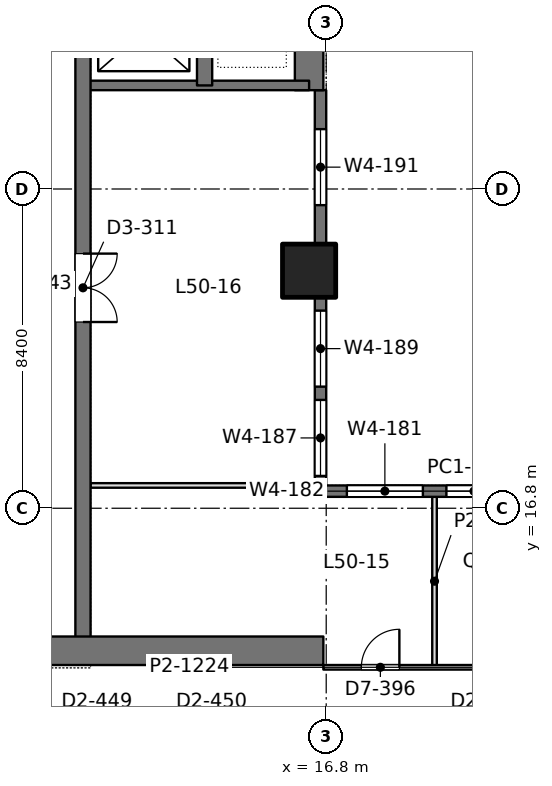
"""IFC4 building model, lengths in metres.
Left out: names, types, materials, properties, quantities, classifications, styles, units other than length and angle.
Written with IfcOpenShell. Run it as: python <this file> out.ifc"""

import sys

from ifc_helpers import new_model, si_unit, direction, frame, frame_2d, origin, origin_2d, place, context, subcontext, project, spatial, rectangle, extrude, element, fill, save


model = new_model("IFC4")
c1 = context("Model", 3, precision=1e-05, world=origin(), true_north=direction((0.0, 1.0)))
c2 = subcontext(c1, "Body", "Model", "MODEL_VIEW")
j1 = project(units=[si_unit("LENGTHUNIT", "METRE"), si_unit("PLANEANGLEUNIT", "RADIAN")], contexts=[c1])
p1 = place(None, origin())
s1 = spatial("IfcSite", under=j1, at=p1, CompositionType="ELEMENT")
p2 = place(p1, origin())
s2 = spatial("IfcBuilding", under=s1, at=p2, CompositionType="ELEMENT")
p3 = place(p2, frame((0.0, 0.0, 219.6)))
s3 = spatial("IfcBuildingStorey", under=s2, at=p3, CompositionType="ELEMENT", Elevation=219.6)
p4 = place(p3, frame((16.35, 23.05, 0.0), z_axis=(0.0, 0.0, 1.0), x_axis=(1.0, 0.0, 0.0)))
e1 = element("IfcColumn", 1, at=p4, inside=s3, PredefinedType="COLUMN", context=c2, shape_type="SweptSolid", body=[
    extrude(rectangle(XDim=1.4, YDim=1.4, at=origin_2d()), origin(), (0.0, 0.0, 1.0), 4.2),
])
p5 = place(p3, frame((-1.125, 13.05, 0.0), z_axis=(0.0, 0.0, 1.0), x_axis=(1.0, 0.0, 0.0)))
e2 = element("IfcWall", 2, at=p5, inside=s3, PredefinedType="SHEAR", context=c2, shape_type="SweptSolid", body=[
    extrude(rectangle(XDim=17.85, YDim=0.75, at=frame_2d((8.925, 0.0))), origin(), (0.0, 0.0, 1.0), 4.2),
])
p6 = place(p5, frame((8.875, 0.0, 0.0)))
e3 = element("IfcOpeningElement", 3, at=p6, cuts=e2, PredefinedType="OPENING", context=c2, shape_type="SweptSolid", body=[
    extrude(rectangle(XDim=1.8, YDim=2.4, at=frame_2d((0.9, 1.2))), frame((0.0, 0.385, 0.0), z_axis=(0.0, -1.0, 0.0), x_axis=(1.0, 0.0, 0.0)), (0.0, 0.0, 1.0), 0.77),
])
p7 = place(p3, frame((16.35, 27.8, 0.0), z_axis=(0.0, 0.0, 1.0), x_axis=(0.0, 1.0, 0.0)))
e4 = element("IfcWall", 4, at=p7, inside=s3, PredefinedType="SHEAR", context=c2, shape_type="SweptSolid", body=[
    extrude(rectangle(XDim=9.55, YDim=0.75, at=frame_2d((4.775, 0.0))), origin(), (0.0, 0.0, 1.0), 4.2),
])
p8 = place(p3, frame((10.4, 13.05, 0.0), z_axis=(0.0, 0.0, 1.0), x_axis=(0.0, 1.0, 0.0)))
e5 = element("IfcWall", 5, at=p8, inside=s3, PredefinedType="SHEAR", context=c2, shape_type="SweptSolid", body=[
    extrude(rectangle(XDim=24.3, YDim=0.4, at=frame_2d((12.15, 0.0))), origin(), (0.0, 0.0, 1.0), 4.2),
])
p9 = place(p8, frame((15.75, 0.0, 0.0)))
e6 = element("IfcOpeningElement", 6, at=p9, cuts=e5, PredefinedType="OPENING", context=c2, shape_type="SweptSolid", body=[
    extrude(rectangle(XDim=1.1, YDim=2.2, at=frame_2d((0.55, 1.1))), frame((0.0, 0.21, 0.0), z_axis=(0.0, -1.0, 0.0), x_axis=(1.0, 0.0, 0.0)), (0.0, 0.0, 1.0), 0.42),
])
p10 = place(p8, frame((18.6, 0.0, 0.0)))
e7 = element("IfcOpeningElement", 7, at=p10, cuts=e5, PredefinedType="OPENING", context=c2, shape_type="SweptSolid", body=[
    extrude(rectangle(XDim=1.1, YDim=2.2, at=frame_2d((0.55, 1.1))), frame((0.0, 0.21, 0.0), z_axis=(0.0, -1.0, 0.0), x_axis=(1.0, 0.0, 0.0)), (0.0, 0.0, 1.0), 0.42),
])
p11 = place(p8, frame((21.45, 0.0, 0.0)))
e8 = element("IfcOpeningElement", 8, at=p11, cuts=e5, PredefinedType="OPENING", context=c2, shape_type="SweptSolid", body=[
    extrude(rectangle(XDim=1.1, YDim=2.2, at=frame_2d((0.55, 1.1))), frame((0.0, 0.21, 0.0), z_axis=(0.0, -1.0, 0.0), x_axis=(1.0, 0.0, 0.0)), (0.0, 0.0, 1.0), 0.42),
])
p12 = place(p8, frame((8.65, 0.0, 0.0)))
e9 = element("IfcOpeningElement", 9, at=p12, cuts=e5, PredefinedType="OPENING", context=c2, shape_type="SweptSolid", body=[
    extrude(rectangle(XDim=1.8, YDim=2.4, at=frame_2d((0.9, 1.2))), frame((0.0, 0.21, 0.0), z_axis=(0.0, -1.0, 0.0), x_axis=(1.0, 0.0, 0.0)), (0.0, 0.0, 1.0), 0.42),
])
p13 = place(p3, frame((13.6, 27.925, 0.0), z_axis=(0.0, 0.0, 1.0), x_axis=(0.0, 1.0, 0.0)))
e10 = element("IfcWall", 10, at=p13, inside=s3, PredefinedType="SHEAR", context=c2, shape_type="SweptSolid", body=[
    extrude(rectangle(XDim=9.425, YDim=0.4, at=frame_2d((4.712, 0.0))), origin(), (0.0, 0.0, 1.0), 4.2),
])
p14 = place(p3, frame((10.4, 27.925, 0.0), z_axis=(0.0, 0.0, 1.0), x_axis=(1.0, 0.0, 0.0)))
e11 = element("IfcWall", 11, at=p14, inside=s3, PredefinedType="SHEAR", context=c2, shape_type="SweptSolid", body=[
    extrude(rectangle(XDim=5.95, YDim=0.25, at=frame_2d((2.975, 0.0))), origin(), (0.0, 0.0, 1.0), 4.2),
])
p15 = place(p3, frame((16.65, 17.1, 0.0), z_axis=(0.0, 0.0, 1.0), x_axis=(0.0, 1.0, 0.0)))
e12 = element("IfcWall", 12, at=p15, inside=s3, PredefinedType="SOLIDWALL", context=c2, shape_type="SweptSolid", body=[
    extrude(rectangle(XDim=10.7, YDim=0.3, at=frame_2d((5.35, 0.0))), origin(), (0.0, 0.0, 1.0), 4.05),
])
p16 = place(p15, frame((0.55, 0.0, 0.9)))
e13 = element("IfcOpeningElement", 13, at=p16, cuts=e12, PredefinedType="OPENING", context=c2, shape_type="SweptSolid", body=[
    extrude(rectangle(XDim=2.0, YDim=1.9, at=frame_2d((1.0, 0.95))), frame((0.0, 0.16, 0.0), z_axis=(0.0, -1.0, 0.0), x_axis=(1.0, 0.0, 0.0)), (0.0, 0.0, 1.0), 0.32),
])
p17 = place(p15, frame((2.9, 0.0, 0.9)))
e14 = element("IfcOpeningElement", 14, at=p17, cuts=e12, PredefinedType="OPENING", context=c2, shape_type="SweptSolid", body=[
    extrude(rectangle(XDim=2.0, YDim=1.9, at=frame_2d((1.0, 0.95))), frame((0.0, 0.16, 0.0), z_axis=(0.0, -1.0, 0.0), x_axis=(1.0, 0.0, 0.0)), (0.0, 0.0, 1.0), 0.32),
])
p18 = place(p15, frame((7.675, 0.0, 0.9)))
e15 = element("IfcOpeningElement", 15, at=p18, cuts=e12, PredefinedType="OPENING", context=c2, shape_type="SweptSolid", body=[
    extrude(rectangle(XDim=2.0, YDim=1.9, at=frame_2d((1.0, 0.95))), frame((0.0, 0.16, 0.0), z_axis=(0.0, -1.0, 0.0), x_axis=(1.0, 0.0, 0.0)), (0.0, 0.0, 1.0), 0.32),
])
p19 = place(p3, frame((16.725, 17.25, 0.0), z_axis=(0.0, 0.0, 1.0), x_axis=(1.0, 0.0, 0.0)))
e16 = element("IfcWall", 16, at=p19, inside=s3, PredefinedType="SOLIDWALL", context=c2, shape_type="SweptSolid", body=[
    extrude(rectangle(XDim=7.925, YDim=0.3, at=frame_2d((3.962, 0.0))), origin(), (0.0, 0.0, 1.0), 4.05),
])
p20 = place(p19, frame((0.619, 0.0, 0.9)))
e17 = element("IfcOpeningElement", 17, at=p20, cuts=e16, PredefinedType="OPENING", context=c2, shape_type="SweptSolid", body=[
    extrude(rectangle(XDim=2.0, YDim=1.9, at=frame_2d((1.0, 0.95))), frame((0.0, 0.16, 0.0), z_axis=(0.0, -1.0, 0.0), x_axis=(1.0, 0.0, 0.0)), (0.0, 0.0, 1.0), 0.32),
])
p21 = place(p19, frame((3.238, 0.0, 0.9)))
e18 = element("IfcOpeningElement", 18, at=p21, cuts=e16, PredefinedType="OPENING", context=c2, shape_type="SweptSolid", body=[
    extrude(rectangle(XDim=2.0, YDim=1.9, at=frame_2d((1.0, 0.95))), frame((0.0, 0.16, 0.0), z_axis=(0.0, -1.0, 0.0), x_axis=(1.0, 0.0, 0.0)), (0.0, 0.0, 1.0), 0.32),
])
p22 = place(p19, frame((5.856, 0.0, 0.9)))
e19 = element("IfcOpeningElement", 19, at=p22, cuts=e16, PredefinedType="OPENING", context=c2, shape_type="SweptSolid", body=[
    extrude(rectangle(XDim=2.0, YDim=1.9, at=frame_2d((1.0, 0.95))), frame((0.0, 0.16, 0.0), z_axis=(0.0, -1.0, 0.0), x_axis=(1.0, 0.0, 0.0)), (0.0, 0.0, 1.0), 0.32),
])
p23 = place(p3, frame((10.598, 17.4, 0.0), z_axis=(0.0, 0.0, 1.0), x_axis=(1.0, 0.0, 0.0)))
e20 = element("IfcWall", 20, at=p23, inside=s3, PredefinedType="PARTITIONING", context=c2, shape_type="SweptSolid", body=[
    extrude(rectangle(XDim=5.904, YDim=0.12, at=frame_2d((2.952, 0.0))), origin(), (0.0, 0.0, 1.0), 3.55),
])
p24 = place(p3, frame((19.65, 12.658, 0.0), z_axis=(0.0, 0.0, 1.0), x_axis=(0.0, 1.0, 0.0)))
e21 = element("IfcWall", 21, at=p24, inside=s3, PredefinedType="PARTITIONING", context=c2, shape_type="SweptSolid", body=[
    extrude(rectangle(XDim=4.444, YDim=0.12, at=frame_2d((2.222, 0.0))), origin(), (0.0, 0.0, 1.0), 3.36),
])
p25 = place(p3, frame((16.725, 12.615, 0.0), z_axis=(0.0, 0.0, 1.0), x_axis=(1.0, 0.0, 0.0)))
e22 = element("IfcWall", 22, at=p25, inside=s3, PredefinedType="PARTITIONING", context=c2, shape_type="SweptSolid", body=[
    extrude(rectangle(XDim=16.95, YDim=0.12, at=frame_2d((8.475, 0.0))), origin(), (0.0, 0.0, 1.0), 3.55),
])
p26 = place(p25, frame((1.0, 0.0, 0.0)))
e23 = element("IfcOpeningElement", 23, at=p26, cuts=e22, PredefinedType="OPENING", context=c2, shape_type="SweptSolid", body=[
    extrude(rectangle(XDim=1.0, YDim=2.4, at=frame_2d((0.5, 1.2))), frame((0.0, 0.07, 0.0), z_axis=(0.0, -1.0, 0.0), x_axis=(1.0, 0.0, 0.0)), (0.0, 0.0, 1.0), 0.14),
])
p27 = place(p25, frame((6.665, 0.0, 0.0)))
e24 = element("IfcOpeningElement", 24, at=p27, cuts=e22, PredefinedType="OPENING", context=c2, shape_type="SweptSolid", body=[
    extrude(rectangle(XDim=1.0, YDim=2.4, at=frame_2d((0.5, 1.2))), frame((0.0, 0.07, 0.0), z_axis=(0.0, -1.0, 0.0), x_axis=(1.0, 0.0, 0.0)), (0.0, 0.0, 1.0), 0.14),
])
p28 = place(p25, frame((13.64, 0.0, 0.0)))
e25 = element("IfcOpeningElement", 25, at=p28, cuts=e22, PredefinedType="OPENING", context=c2, shape_type="SweptSolid", body=[
    extrude(rectangle(XDim=1.0, YDim=2.4, at=frame_2d((0.5, 1.2))), frame((0.0, 0.07, 0.0), z_axis=(0.0, -1.0, 0.0), x_axis=(1.0, 0.0, 0.0)), (0.0, 0.0, 1.0), 0.14),
])
p29 = place(p16, origin())
e26 = element("IfcWindow", 26, at=p29, inside=s3, PartitioningType="SINGLE_PANEL", PredefinedType="WINDOW", context=c2, shape_type="SweptSolid", body=[
    extrude(rectangle(XDim=2.0, YDim=1.9, at=frame_2d((1.0, 0.95))), frame((0.0, 0.03, 0.0), z_axis=(0.0, -1.0, 0.0), x_axis=(1.0, 0.0, 0.0)), (0.0, 0.0, 1.0), 0.06),
])
fill(e13, e26)
p30 = place(p17, origin())
e27 = element("IfcWindow", 27, at=p30, inside=s3, PartitioningType="SINGLE_PANEL", PredefinedType="WINDOW", context=c2, shape_type="SweptSolid", body=[
    extrude(rectangle(XDim=2.0, YDim=1.9, at=frame_2d((1.0, 0.95))), frame((0.0, 0.03, 0.0), z_axis=(0.0, -1.0, 0.0), x_axis=(1.0, 0.0, 0.0)), (0.0, 0.0, 1.0), 0.06),
])
fill(e14, e27)
p31 = place(p18, origin())
e28 = element("IfcWindow", 28, at=p31, inside=s3, PartitioningType="SINGLE_PANEL", PredefinedType="WINDOW", context=c2, shape_type="SweptSolid", body=[
    extrude(rectangle(XDim=2.0, YDim=1.9, at=frame_2d((1.0, 0.95))), frame((0.0, 0.03, 0.0), z_axis=(0.0, -1.0, 0.0), x_axis=(1.0, 0.0, 0.0)), (0.0, 0.0, 1.0), 0.06),
])
fill(e15, e28)
p32 = place(p20, origin())
e29 = element("IfcWindow", 29, at=p32, inside=s3, PartitioningType="SINGLE_PANEL", PredefinedType="WINDOW", context=c2, shape_type="SweptSolid", body=[
    extrude(rectangle(XDim=2.0, YDim=1.9, at=frame_2d((1.0, 0.95))), frame((0.0, 0.03, 0.0), z_axis=(0.0, -1.0, 0.0), x_axis=(1.0, 0.0, 0.0)), (0.0, 0.0, 1.0), 0.06),
])
fill(e17, e29)
p33 = place(p21, origin())
e30 = element("IfcWindow", 30, at=p33, inside=s3, PartitioningType="SINGLE_PANEL", PredefinedType="WINDOW", context=c2, shape_type="SweptSolid", body=[
    extrude(rectangle(XDim=2.0, YDim=1.9, at=frame_2d((1.0, 0.95))), frame((0.0, 0.03, 0.0), z_axis=(0.0, -1.0, 0.0), x_axis=(1.0, 0.0, 0.0)), (0.0, 0.0, 1.0), 0.06),
])
fill(e18, e30)
p34 = place(p12, frame((1.8, 0.0, 0.0), z_axis=(0.0, 0.0, 1.0), x_axis=(-1.0, 0.0, 0.0)))
e31 = element("IfcDoor", 31, at=p34, inside=s3, OperationType="DOUBLE_DOOR_SINGLE_SWING", PredefinedType="DOOR", context=c2, shape_type="SweptSolid", body=[
    extrude(rectangle(XDim=1.8, YDim=2.4, at=frame_2d((0.9, 1.2))), frame((0.0, 0.025, 0.0), z_axis=(0.0, -1.0, 0.0), x_axis=(1.0, 0.0, 0.0)), (0.0, 0.0, 1.0), 0.05),
])
fill(e9, e31)
p35 = place(p26, origin())
e32 = element("IfcDoor", 32, at=p35, inside=s3, OperationType="SINGLE_SWING_RIGHT", PredefinedType="DOOR", context=c2, shape_type="SweptSolid", body=[
    extrude(rectangle(XDim=1.0, YDim=2.4, at=frame_2d((0.5, 1.2))), frame((0.0, 0.025, 0.0), z_axis=(0.0, -1.0, 0.0), x_axis=(1.0, 0.0, 0.0)), (0.0, 0.0, 1.0), 0.05),
])
fill(e23, e32)
save(model, sys.argv[1])
